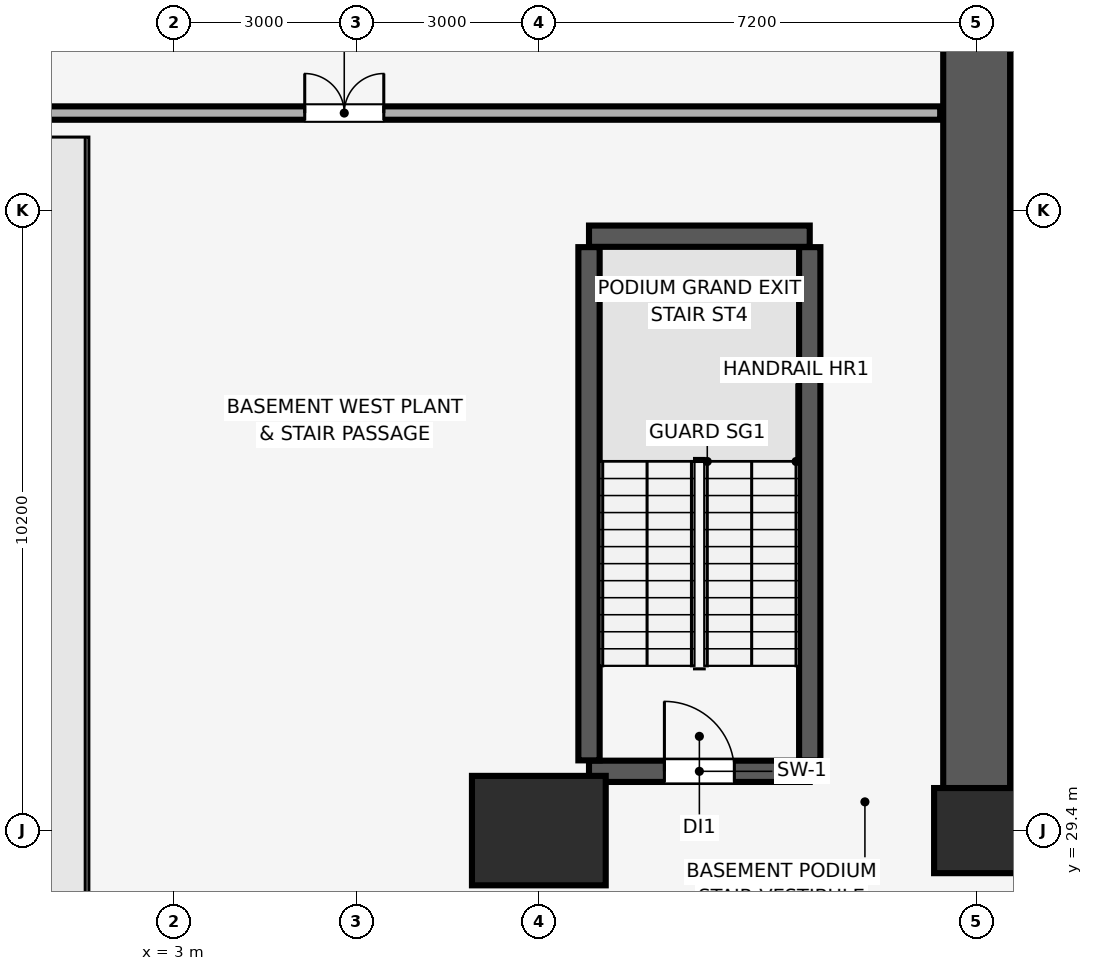
"""IFC4 building model, lengths in metres.
Left out: names, types, materials, properties, quantities, classifications, styles, units other than length and angle.
Written with IfcOpenShell. Run it as: python <this file> out.ifc"""

import sys

from ifc_helpers import new_model, si_unit, direction, frame, frame_2d, origin, origin_2d, place, context, subcontext, project, spatial, rectangle, extrude, element, fill, save


model = new_model("IFC4")
c1 = context("Model", 3, precision=1e-05, world=origin(), true_north=direction((0.0, 1.0)))
c2 = subcontext(c1, "Body", "Model", "MODEL_VIEW")
j1 = project(units=[si_unit("LENGTHUNIT", "METRE"), si_unit("PLANEANGLEUNIT", "RADIAN")], contexts=[c1])
p1 = place(None, origin())
s1 = spatial("IfcSite", under=j1, at=p1, CompositionType="ELEMENT")
p2 = place(p1, origin())
s2 = spatial("IfcBuilding", under=s1, at=p2, CompositionType="ELEMENT")
p3 = place(p2, frame((0.0, 0.0, -9.2)))
s3 = spatial("IfcBuildingStorey", under=s2, at=p3, CompositionType="ELEMENT", Elevation=-9.2)
p4 = place(p3, frame((9.0, 29.4, 0.0), z_axis=(0.0, 0.0, 1.0), x_axis=(1.0, 0.0, 0.0)))
e1 = element("IfcColumn", 1, at=p4, inside=s3, PredefinedType="USERDEFINED", context=c2, shape_type="SweptSolid", body=[
    extrude(rectangle(XDim=2.2, YDim=1.8, at=origin_2d()), origin(), (0.0, 0.0, 1.0), 4.3),
])
p5 = place(p3, frame((16.2, 29.4, 0.0), z_axis=(0.0, 0.0, 1.0), x_axis=(1.0, 0.0, 0.0)))
e2 = element("IfcColumn", 2, at=p5, inside=s3, PredefinedType="COLUMN", context=c2, shape_type="SweptSolid", body=[
    extrude(rectangle(XDim=1.4, YDim=1.4, at=origin_2d()), origin(), (0.0, 0.0, 1.0), 4.3),
])
p6 = place(p3, frame((16.2, 29.4, 0.0), z_axis=(0.0, 0.0, 1.0), x_axis=(0.0, 1.0, 0.0)))
e3 = element("IfcWall", 3, at=p6, inside=s3, PredefinedType="SHEAR", context=c2, shape_type="SweptSolid", body=[
    extrude(rectangle(XDim=19.2, YDim=1.1, at=frame_2d((9.6, 0.0))), origin(), (0.0, 0.0, 1.0), 4.3),
])
p7 = place(p3, frame((16.755, 29.4, 0.0), z_axis=(0.0, 0.0, 1.0), x_axis=(1.0, 0.0, 0.0)))
e4 = element("IfcWall", 4, at=p7, inside=s3, PredefinedType="SHEAR", context=c2, shape_type="SweptSolid", body=[
    extrude(rectangle(XDim=6.845, YDim=1.1, at=frame_2d((3.423, 0.0))), origin(), (0.0, 0.0, 1.0), 4.3),
])
p8 = place(p3, frame((16.755, 40.025, 0.0), z_axis=(0.0, 0.0, 1.0), x_axis=(1.0, 0.0, 0.0)))
e5 = element("IfcWall", 5, at=p8, inside=s3, PredefinedType="SHEAR", context=c2, shape_type="SweptSolid", body=[
    extrude(rectangle(XDim=4.1, YDim=0.35, at=frame_2d((2.05, 0.0))), origin(), (0.0, 0.0, 1.0), 4.3),
])
p9 = place(p8, frame((1.71, 0.0, 0.0)))
e6 = element("IfcOpeningElement", 6, at=p9, cuts=e5, PredefinedType="OPENING", context=c2, shape_type="SweptSolid", body=[
    extrude(rectangle(XDim=1.15, YDim=2.15, at=frame_2d((0.575, 1.075))), frame((0.0, 0.185, 0.0), z_axis=(0.0, -1.0, 0.0), x_axis=(1.0, 0.0, 0.0)), (0.0, 0.0, 1.0), 0.37),
])
p10 = place(p3, frame((9.825, 30.375, 0.0), z_axis=(0.0, 0.0, 1.0), x_axis=(1.0, 0.0, 0.0)))
e7 = element("IfcWall", 7, at=p10, inside=s3, PredefinedType="SHEAR", context=c2, shape_type="SweptSolid", body=[
    extrude(rectangle(XDim=3.63, YDim=0.35, at=frame_2d((1.815, 0.0))), origin(), (0.0, 0.0, 1.0), 4.3),
])
p11 = place(p10, frame((1.24, 0.0, 0.0)))
e8 = element("IfcOpeningElement", 8, at=p11, cuts=e7, PredefinedType="OPENING", context=c2, shape_type="SweptSolid", body=[
    extrude(rectangle(XDim=1.15, YDim=2.15, at=frame_2d((0.575, 1.075))), frame((0.0, 0.185, 0.0), z_axis=(0.0, -1.0, 0.0), x_axis=(1.0, 0.0, 0.0)), (0.0, 0.0, 1.0), 0.37),
])
p12 = place(p3, frame((9.825, 39.175, 0.0), z_axis=(0.0, 0.0, 1.0), x_axis=(1.0, 0.0, 0.0)))
e9 = element("IfcWall", 9, at=p12, inside=s3, PredefinedType="SHEAR", context=c2, shape_type="SweptSolid", body=[
    extrude(rectangle(XDim=3.63, YDim=0.35, at=frame_2d((1.815, 0.0))), origin(), (0.0, 0.0, 1.0), 4.3),
])
for number, where, z_axis, x_axis in (
    (10, (9.825, 30.555, 0.0), (0.0, 0.0, 1.0), (0.0, 1.0, 0.0)),
    (11, (13.455, 30.555, 0.0), (0.0, 0.0, 1.0), (0.0, 1.0, 0.0)),
):
    element("IfcWall", number, at=place(p3, frame(where, z_axis=z_axis, x_axis=x_axis)), inside=s3, PredefinedType="SHEAR", context=c2, shape_type="SweptSolid", body=[
        extrude(rectangle(XDim=8.44, YDim=0.35, at=frame_2d((4.22, 0.0))), origin(), (0.0, 0.0, 1.0), 4.3),
    ])
p13 = place(p3, frame((-2.895, 41.2, 0.0), z_axis=(0.0, 0.0, 1.0), x_axis=(1.0, 0.0, 0.0)))
e12 = element("IfcWall", 12, at=p13, inside=s3, PredefinedType="PARTITIONING", context=c2, shape_type="SweptSolid", body=[
    extrude(rectangle(XDim=18.495, YDim=0.22, at=frame_2d((9.248, 0.0))), origin(), (0.0, 0.0, 1.0), 4.3),
])
p14 = place(p13, frame((8.045, 0.0, 0.0)))
e13 = element("IfcOpeningElement", 13, at=p14, cuts=e12, PredefinedType="OPENING", context=c2, shape_type="SweptSolid", body=[
    extrude(rectangle(XDim=1.3, YDim=2.2, at=frame_2d((0.65, 1.1))), frame((0.0, 0.12, 0.0), z_axis=(0.0, -1.0, 0.0), x_axis=(1.0, 0.0, 0.0)), (0.0, 0.0, 1.0), 0.24),
])
p15 = place(p11, origin())
e14 = element("IfcDoor", 14, at=p15, inside=s3, OperationType="SINGLE_SWING_LEFT", PredefinedType="DOOR", context=c2, shape_type="SweptSolid", body=[
    extrude(rectangle(XDim=1.15, YDim=2.15, at=frame_2d((0.575, 1.075))), frame((0.0, 0.025, 0.0), z_axis=(0.0, -1.0, 0.0), x_axis=(1.0, 0.0, 0.0)), (0.0, 0.0, 1.0), 0.05),
])
fill(e8, e14)
p16 = place(p14, origin())
e15 = element("IfcDoor", 15, at=p16, inside=s3, OperationType="DOUBLE_DOOR_SINGLE_SWING", PredefinedType="DOOR", context=c2, shape_type="SweptSolid", body=[
    extrude(rectangle(XDim=1.3, YDim=2.2, at=frame_2d((0.65, 1.1))), frame((0.0, 0.025, 0.0), z_axis=(0.0, -1.0, 0.0), x_axis=(1.0, 0.0, 0.0)), (0.0, 0.0, 1.0), 0.05),
])
fill(e13, e15)
save(model, sys.argv[1])
